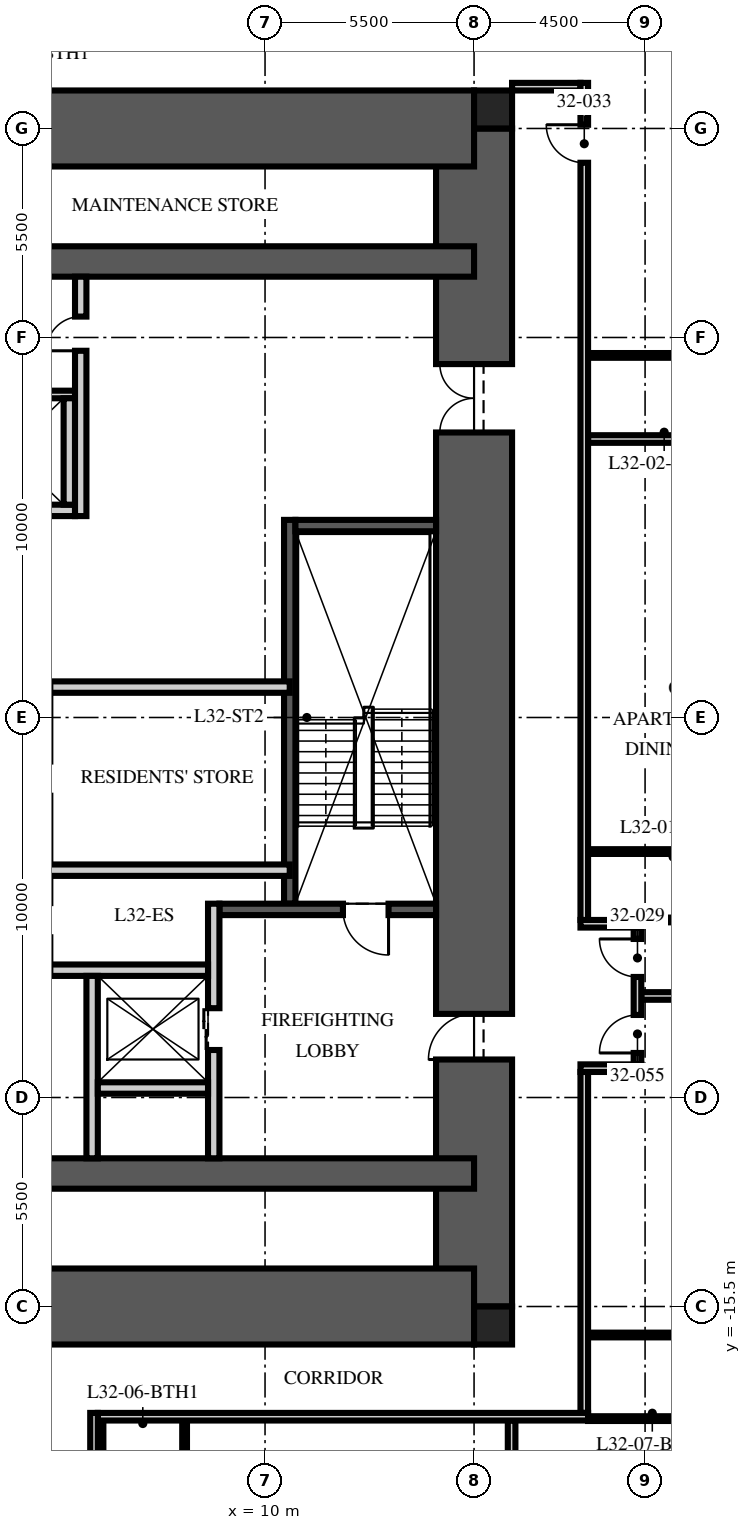
"""IFC4 building model, lengths in metres.
Left out: names, types, materials, properties, quantities, classifications, styles, units other than length and angle.
Written with IfcOpenShell. Run it as: python <this file> out.ifc"""

import sys

from ifc_helpers import new_model, si_unit, direction, frame, frame_2d, origin, origin_2d, place, context, subcontext, project, spatial, rectangle, extrude, element, fill, save


model = new_model("IFC4")
c1 = context("Model", 3, precision=1e-05, world=origin(), true_north=direction((0.0, 1.0)))
c2 = subcontext(c1, "Body", "Model", "MODEL_VIEW")
j1 = project(units=[si_unit("LENGTHUNIT", "METRE"), si_unit("PLANEANGLEUNIT", "RADIAN")], contexts=[c1])
p1 = place(None, origin())
s1 = spatial("IfcSite", under=j1, at=p1, CompositionType="ELEMENT")
p2 = place(p1, origin())
s2 = spatial("IfcBuilding", under=s1, at=p2, CompositionType="ELEMENT")
p3 = place(p2, frame((0.0, 0.0, 129.75)))
s3 = spatial("IfcBuildingStorey", under=s2, at=p3, CompositionType="ELEMENT", Elevation=129.75)
p4 = place(p3, frame((15.5, -15.5, -0.25), z_axis=(0.0, 0.0, 1.0), x_axis=(0.0, 1.0, 0.0)))
e1 = element("IfcWall", 1, at=p4, inside=s3, PredefinedType="SHEAR", context=c2, shape_type="SweptSolid", body=[
    extrude(rectangle(XDim=31.0, YDim=2.0, at=frame_2d((15.5, 0.0))), origin(), (0.0, 0.0, 1.0), 3.75),
])
p5 = place(p4, frame((6.5, 0.0, 0.25)))
e2 = element("IfcOpeningElement", 2, at=p5, cuts=e1, PredefinedType="OPENING", context=c2, shape_type="SweptSolid", body=[
    extrude(rectangle(XDim=1.2, YDim=2.1, at=frame_2d((0.6, 1.05))), frame((0.0, 1.01, 0.0), z_axis=(0.0, -1.0, 0.0), x_axis=(1.0, 0.0, 0.0)), (0.0, 0.0, 1.0), 2.02),
])
p6 = place(p4, frame((23.0, 0.0, 0.25)))
e3 = element("IfcOpeningElement", 3, at=p6, cuts=e1, PredefinedType="OPENING", context=c2, shape_type="SweptSolid", body=[
    extrude(rectangle(XDim=1.8, YDim=2.1, at=frame_2d((0.9, 1.05))), frame((0.0, 1.01, 0.0), z_axis=(0.0, -1.0, 0.0), x_axis=(1.0, 0.0, 0.0)), (0.0, 0.0, 1.0), 2.02),
])
p7 = place(p3, frame((-15.5, 15.5, -0.25), z_axis=(0.0, 0.0, 1.0), x_axis=(1.0, 0.0, 0.0)))
e4 = element("IfcWall", 4, at=p7, inside=s3, PredefinedType="SHEAR", context=c2, shape_type="SweptSolid", body=[
    extrude(rectangle(XDim=31.0, YDim=2.0, at=frame_2d((15.5, 0.0))), origin(), (0.0, 0.0, 1.0), 3.75),
])
p8 = place(p7, frame((5.0, 0.0, 0.25)))
e5 = element("IfcOpeningElement", 5, at=p8, cuts=e4, PredefinedType="OPENING", context=c2, shape_type="SweptSolid", body=[
    extrude(rectangle(XDim=1.0, YDim=2.1, at=frame_2d((0.5, 1.05))), frame((0.0, 1.01, 0.0), z_axis=(0.0, -1.0, 0.0), x_axis=(1.0, 0.0, 0.0)), (0.0, 0.0, 1.0), 2.02),
])
p9 = place(p3, frame((-15.5, -15.5, -0.25), z_axis=(0.0, 0.0, 1.0), x_axis=(1.0, 0.0, 0.0)))
e6 = element("IfcWall", 6, at=p9, inside=s3, PredefinedType="SHEAR", context=c2, shape_type="SweptSolid", body=[
    extrude(rectangle(XDim=31.0, YDim=2.0, at=frame_2d((15.5, 0.0))), origin(), (0.0, 0.0, 1.0), 3.75),
])
p10 = place(p9, frame((10.4, 0.0, 0.25)))
e7 = element("IfcOpeningElement", 7, at=p10, cuts=e6, PredefinedType="OPENING", context=c2, shape_type="SweptSolid", body=[
    extrude(rectangle(XDim=1.1, YDim=2.1, at=frame_2d((0.55, 1.05))), frame((0.0, 1.01, 0.0), z_axis=(0.0, -1.0, 0.0), x_axis=(1.0, 0.0, 0.0)), (0.0, 0.0, 1.0), 2.02),
])
p11 = place(p9, frame((13.5, 0.0, 0.25)))
e8 = element("IfcOpeningElement", 8, at=p11, cuts=e6, PredefinedType="OPENING", context=c2, shape_type="SweptSolid", body=[
    extrude(rectangle(XDim=1.1, YDim=2.1, at=frame_2d((0.55, 1.05))), frame((0.0, 1.01, 0.0), z_axis=(0.0, -1.0, 0.0), x_axis=(1.0, 0.0, 0.0)), (0.0, 0.0, 1.0), 2.02),
])
p12 = place(p9, frame((16.6, 0.0, 0.25)))
e9 = element("IfcOpeningElement", 9, at=p12, cuts=e6, PredefinedType="OPENING", context=c2, shape_type="SweptSolid", body=[
    extrude(rectangle(XDim=1.1, YDim=2.1, at=frame_2d((0.55, 1.05))), frame((0.0, 1.01, 0.0), z_axis=(0.0, -1.0, 0.0), x_axis=(1.0, 0.0, 0.0)), (0.0, 0.0, 1.0), 2.02),
])
for number, where, z_axis, x_axis in (
    (10, (-15.5, 12.0, -0.25), (0.0, 0.0, 1.0), (1.0, 0.0, 0.0)),
    (11, (-15.5, -12.0, -0.25), (0.0, 0.0, 1.0), (1.0, 0.0, 0.0)),
):
    element("IfcWall", number, at=place(p3, frame(where, z_axis=z_axis, x_axis=x_axis)), inside=s3, PredefinedType="SHEAR", context=c2, shape_type="SweptSolid", body=[
        extrude(rectangle(XDim=31.0, YDim=0.8, at=frame_2d((15.5, 0.0))), origin(), (0.0, 0.0, 1.0), 3.75),
    ])
for number, where, z_axis, x_axis in (
    (12, (16.0, 16.0, -0.25), (0.0, 0.0, 1.0), (1.0, 0.0, 0.0)),
    (13, (16.0, -16.0, -0.25), (0.0, 0.0, 1.0), (1.0, 0.0, 0.0)),
):
    element("IfcColumn", number, at=place(p3, frame(where, z_axis=z_axis, x_axis=x_axis)), inside=s3, PredefinedType="COLUMN", context=c2, shape_type="SweptSolid", body=[
        extrude(rectangle(XDim=1.0, YDim=1.0, at=origin_2d()), origin(), (0.0, 0.0, 1.0), 3.75),
    ])
p13 = place(p3, frame((10.65, -4.9, 0.0), z_axis=(0.0, 0.0, 1.0), x_axis=(0.0, 1.0, 0.0)))
e14 = element("IfcWall", 14, at=p13, inside=s3, PredefinedType="SOLIDWALL", context=c2, shape_type="SweptSolid", body=[
    extrude(rectangle(XDim=10.1, YDim=0.3, at=frame_2d((5.05, 0.0))), origin(), (0.0, 0.0, 1.0), 3.5),
])
p14 = place(p3, frame((14.5, -5.05, 0.0), z_axis=(0.0, 0.0, 1.0), x_axis=(-1.0, 0.0, 0.0)))
e15 = element("IfcWall", 15, at=p14, inside=s3, PredefinedType="SOLIDWALL", context=c2, shape_type="SweptSolid", body=[
    extrude(rectangle(XDim=5.7, YDim=0.3, at=frame_2d((2.85, 0.0))), origin(), (0.0, 0.0, 1.0), 3.5),
])
p15 = place(p14, frame((1.25, 0.0, 0.0)))
e16 = element("IfcOpeningElement", 16, at=p15, cuts=e15, PredefinedType="OPENING", context=c2, shape_type="SweptSolid", body=[
    extrude(rectangle(XDim=1.2, YDim=2.1, at=frame_2d((0.6, 1.05))), frame((0.0, 0.16, 0.0), z_axis=(0.0, -1.0, 0.0), x_axis=(1.0, 0.0, 0.0)), (0.0, 0.0, 1.0), 0.32),
])
p16 = place(p3, frame((14.5, 5.05, 0.0), z_axis=(0.0, 0.0, 1.0), x_axis=(-1.0, 0.0, 0.0)))
e17 = element("IfcWall", 17, at=p16, inside=s3, PredefinedType="SOLIDWALL", context=c2, shape_type="SweptSolid", body=[
    extrude(rectangle(XDim=3.7, YDim=0.3, at=frame_2d((1.85, 0.0))), origin(), (0.0, 0.0, 1.0), 3.5),
])
p17 = place(p3, frame((8.65, -11.6, 0.0), z_axis=(0.0, 0.0, 1.0), x_axis=(0.0, 1.0, 0.0)))
e18 = element("IfcWall", 18, at=p17, inside=s3, PredefinedType="PARTITIONING", context=c2, shape_type="SweptSolid", body=[
    extrude(rectangle(XDim=6.7, YDim=0.3, at=frame_2d((3.35, 0.0))), origin(), (0.0, 0.0, 1.0), 3.5),
])
p18 = place(p17, frame((2.85, 0.0, 0.0)))
e19 = element("IfcOpeningElement", 19, at=p18, cuts=e18, PredefinedType="OPENING", context=c2, shape_type="SweptSolid", body=[
    extrude(rectangle(XDim=1.1, YDim=2.1, at=frame_2d((0.55, 1.05))), frame((0.0, 0.16, 0.0), z_axis=(0.0, -1.0, 0.0), x_axis=(1.0, 0.0, 0.0)), (0.0, 0.0, 1.0), 0.32),
])
p19 = place(p3, frame((-8.5, -6.65, 0.0), z_axis=(0.0, 0.0, 1.0), x_axis=(1.0, 0.0, 0.0)))
e20 = element("IfcWall", 20, at=p19, inside=s3, PredefinedType="PARTITIONING", context=c2, shape_type="SweptSolid", body=[
    extrude(rectangle(XDim=17.0, YDim=0.3, at=frame_2d((8.5, 0.0))), origin(), (0.0, 0.0, 1.0), 3.5),
])
p20 = place(p19, frame((7.8, 0.0, 0.0)))
e21 = element("IfcOpeningElement", 21, at=p20, cuts=e20, PredefinedType="OPENING", context=c2, shape_type="SweptSolid", body=[
    extrude(rectangle(XDim=1.3, YDim=2.4, at=frame_2d((0.65, 1.2))), frame((0.0, 0.16, 0.0), z_axis=(0.0, -1.0, 0.0), x_axis=(1.0, 0.0, 0.0)), (0.0, 0.0, 1.0), 0.32),
])
p21 = place(p19, frame((5.65, 0.0, 0.0)))
e22 = element("IfcOpeningElement", 22, at=p21, cuts=e20, PredefinedType="OPENING", context=c2, shape_type="SweptSolid", body=[
    extrude(rectangle(XDim=0.9, YDim=2.1, at=frame_2d((0.45, 1.05))), frame((0.0, 0.16, 0.0), z_axis=(0.0, -1.0, 0.0), x_axis=(1.0, 0.0, 0.0)), (0.0, 0.0, 1.0), 0.32),
])
p22 = place(p19, frame((10.4, 0.0, 0.0)))
e23 = element("IfcOpeningElement", 23, at=p22, cuts=e20, PredefinedType="OPENING", context=c2, shape_type="SweptSolid", body=[
    extrude(rectangle(XDim=0.9, YDim=2.1, at=frame_2d((0.45, 1.05))), frame((0.0, 0.16, 0.0), z_axis=(0.0, -1.0, 0.0), x_axis=(1.0, 0.0, 0.0)), (0.0, 0.0, 1.0), 0.32),
])
p23 = place(p3, frame((5.45, -11.6, 0.0), z_axis=(0.0, 0.0, 1.0), x_axis=(0.0, 1.0, 0.0)))
e24 = element("IfcWall", 24, at=p23, inside=s3, PredefinedType="PARTITIONING", context=c2, shape_type="SweptSolid", body=[
    extrude(rectangle(XDim=4.8, YDim=0.3, at=frame_2d((2.4, 0.0))), origin(), (0.0, 0.0, 1.0), 3.5),
])
p24 = place(p3, frame((5.6, -9.75, 0.0), z_axis=(0.0, 0.0, 1.0), x_axis=(1.0, 0.0, 0.0)))
e25 = element("IfcWall", 25, at=p24, inside=s3, PredefinedType="PARTITIONING", context=c2, shape_type="SweptSolid", body=[
    extrude(rectangle(XDim=2.9, YDim=0.3, at=frame_2d((1.45, 0.0))), origin(), (0.0, 0.0, 1.0), 3.5),
])
p25 = place(p3, frame((-4.7, 5.45, 0.0), z_axis=(0.0, 0.0, 1.0), x_axis=(1.0, 0.0, 0.0)))
e26 = element("IfcWall", 26, at=p25, inside=s3, PredefinedType="PARTITIONING", context=c2, shape_type="SweptSolid", body=[
    extrude(rectangle(XDim=9.7, YDim=0.3, at=frame_2d((4.85, 0.0))), origin(), (0.0, 0.0, 1.0), 3.5),
])
p26 = place(p3, frame((-4.7, 8.5, 0.0), z_axis=(0.0, 0.0, 1.0), x_axis=(1.0, 0.0, 0.0)))
e27 = element("IfcWall", 27, at=p26, inside=s3, PredefinedType="PARTITIONING", context=c2, shape_type="SweptSolid", body=[
    extrude(rectangle(XDim=9.7, YDim=0.2, at=frame_2d((4.85, 0.0))), origin(), (0.0, 0.0, 1.0), 3.5),
])
p27 = place(p3, frame((4.85, 5.6, 0.0), z_axis=(0.0, 0.0, 1.0), x_axis=(0.0, 1.0, 0.0)))
e28 = element("IfcWall", 28, at=p27, inside=s3, PredefinedType="PARTITIONING", context=c2, shape_type="SweptSolid", body=[
    extrude(rectangle(XDim=2.8, YDim=0.3, at=frame_2d((1.4, 0.0))), origin(), (0.0, 0.0, 1.0), 3.5),
])
p28 = place(p3, frame((-10.65, 0.8, 0.0), z_axis=(0.0, 0.0, 1.0), x_axis=(1.0, 0.0, 0.0)))
e29 = element("IfcWall", 29, at=p28, inside=s3, PredefinedType="PARTITIONING", context=c2, shape_type="SweptSolid", body=[
    extrude(rectangle(XDim=21.3, YDim=0.3, at=frame_2d((10.65, 0.0))), origin(), (0.0, 0.0, 1.0), 3.5),
])
p29 = place(p28, frame((10.05, 0.0, 0.0)))
e30 = element("IfcOpeningElement", 30, at=p29, cuts=e29, PredefinedType="OPENING", context=c2, shape_type="SweptSolid", body=[
    extrude(rectangle(XDim=1.2, YDim=2.1, at=frame_2d((0.6, 1.05))), frame((0.0, 0.16, 0.0), z_axis=(0.0, -1.0, 0.0), x_axis=(1.0, 0.0, 0.0)), (0.0, 0.0, 1.0), 0.32),
])
p30 = place(p28, frame((0.793, 0.0, 0.0)))
e31 = element("IfcOpeningElement", 31, at=p30, cuts=e29, PredefinedType="OPENING", context=c2, shape_type="SweptSolid", body=[
    extrude(rectangle(XDim=0.9, YDim=2.1, at=frame_2d((0.45, 1.05))), frame((0.0, 0.16, 0.0), z_axis=(0.0, -1.0, 0.0), x_axis=(1.0, 0.0, 0.0)), (0.0, 0.0, 1.0), 0.32),
])
p31 = place(p3, frame((10.65, -4.018, 0.0), z_axis=(0.0, 0.0, 1.0), x_axis=(-1.0, 0.0, 0.0)))
e32 = element("IfcWall", 32, at=p31, inside=s3, PredefinedType="PARTITIONING", context=c2, shape_type="SweptSolid", body=[
    extrude(rectangle(XDim=6.45, YDim=0.3, at=frame_2d((3.225, 0.0))), origin(), (0.0, 0.0, 1.0), 3.5),
])
p32 = place(p3, frame((5.15, 5.3, 0.0), z_axis=(0.0, 0.0, 1.0), x_axis=(0.0, 1.0, 0.0)))
e33 = element("IfcWall", 33, at=p32, inside=s3, PredefinedType="PARTITIONING", context=c2, shape_type="SweptSolid", body=[
    extrude(rectangle(XDim=6.3, YDim=0.3, at=frame_2d((3.15, 0.0))), origin(), (0.0, 0.0, 1.0), 3.5),
])
p33 = place(p32, frame((4.35, 0.0, 0.0)))
e34 = element("IfcOpeningElement", 34, at=p33, cuts=e33, PredefinedType="OPENING", context=c2, shape_type="SweptSolid", body=[
    extrude(rectangle(XDim=0.9, YDim=2.1, at=frame_2d((0.45, 1.05))), frame((0.0, 0.16, 0.0), z_axis=(0.0, -1.0, 0.0), x_axis=(1.0, 0.0, 0.0)), (0.0, 0.0, 1.0), 0.32),
])
p34 = place(p3, frame((16.5, 16.6, 0.0), z_axis=(0.0, 0.0, 1.0), x_axis=(1.0, 0.0, 0.0)))
e35 = element("IfcWall", 35, at=p34, inside=s3, PredefinedType="PARTITIONING", context=c2, shape_type="SweptSolid", body=[
    extrude(rectangle(XDim=1.8, YDim=0.2, at=frame_2d((0.9, 0.0))), origin(), (0.0, 0.0, 1.0), 2.3),
])
p35 = place(p3, frame((19.9, -7.328, 0.0), z_axis=(0.0, 0.0, 1.0), x_axis=(1.0, 0.0, 0.0)))
e36 = element("IfcWall", 36, at=p35, inside=s3, PredefinedType="PARTITIONING", context=c2, shape_type="SweptSolid", body=[
    extrude(rectangle(XDim=9.0, YDim=0.2, at=frame_2d((4.5, 0.0))), origin(), (0.0, 0.0, 1.0), 2.81),
])
for number, where, z_axis, x_axis in (
    (37, (18.5, 7.328, 0.0), (0.0, 0.0, 1.0), (1.0, 0.0, 0.0)),
    (38, (16.488, -18.5, 0.0), (0.0, 0.0, 1.0), (0.0, -1.0, 0.0)),
):
    element("IfcWall", number, at=place(p3, frame(where, z_axis=z_axis, x_axis=x_axis)), inside=s3, PredefinedType="PARTITIONING", context=c2, shape_type="SweptSolid", body=[
        extrude(rectangle(XDim=10.4, YDim=0.2, at=frame_2d((5.2, 0.0))), origin(), (0.0, 0.0, 1.0), 2.81),
    ])
p36 = place(p3, frame((19.97, -5.328, 0.0), z_axis=(0.0, 0.0, 1.0), x_axis=(1.0, 0.0, 0.0)))
e39 = element("IfcWall", 39, at=p36, inside=s3, PredefinedType="PARTITIONING", context=c2, shape_type="SweptSolid", body=[
    extrude(rectangle(XDim=2.81, YDim=0.125, at=frame_2d((1.405, 0.0))), origin(), (0.0, 0.0, 1.0), 3.5),
])
for number, where, z_axis, x_axis in (
    (40, (18.5, -3.528, 0.0), (0.0, 0.0, 1.0), (1.0, 0.0, 0.0)),
    (41, (18.5, 9.528, 0.0), (0.0, 0.0, 1.0), (1.0, 0.0, 0.0)),
    (42, (5.684, -18.5, 0.0), (0.0, 0.0, 1.0), (0.0, -1.0, 0.0)),
    (43, (7.884, -18.5, 0.0), (0.0, 0.0, 1.0), (0.0, -1.0, 0.0)),
):
    element("IfcWall", number, at=place(p3, frame(where, z_axis=z_axis, x_axis=x_axis)), inside=s3, PredefinedType="PARTITIONING", context=c2, shape_type="SweptSolid", body=[
        extrude(rectangle(XDim=4.28, YDim=0.125, at=frame_2d((2.14, 0.0))), origin(), (0.0, 0.0, 1.0), 3.5),
    ])
p37 = place(p3, frame((18.5, -18.45, 0.0), z_axis=(0.0, 0.0, 1.0), x_axis=(1.0, 0.0, 0.0)))
e44 = element("IfcWall", 44, at=p37, inside=s3, PredefinedType="PARTITIONING", context=c2, shape_type="SweptSolid", body=[
    extrude(rectangle(XDim=4.28, YDim=0.125, at=frame_2d((2.14, 0.0))), origin(), (0.0, 0.0, 1.0), 2.3),
])
p38 = place(p3, frame((18.5, -16.25, 0.0), z_axis=(0.0, 0.0, 1.0), x_axis=(1.0, 0.0, 0.0)))
e45 = element("IfcWall", 45, at=p38, inside=s3, PredefinedType="PARTITIONING", context=c2, shape_type="SweptSolid", body=[
    extrude(rectangle(XDim=4.28, YDim=0.125, at=frame_2d((2.14, 0.0))), origin(), (0.0, 0.0, 1.0), 3.5),
])
p39 = place(p3, frame((18.4, -18.3, 0.0), z_axis=(0.0, 0.0, 1.0), x_axis=(0.0, 1.0, 0.0)))
e46 = element("IfcWall", 46, at=p39, inside=s3, PredefinedType="PARTITIONING", context=c2, shape_type="SweptSolid", body=[
    extrude(rectangle(XDim=8.972, YDim=0.2, at=frame_2d((4.486, 0.0))), origin(), (0.0, 0.0, 1.0), 2.3),
])
p40 = place(p3, frame((18.3, -9.228, 0.0), z_axis=(0.0, 0.0, 1.0), x_axis=(1.0, 0.0, 0.0)))
e47 = element("IfcWall", 47, at=p40, inside=s3, PredefinedType="PARTITIONING", context=c2, shape_type="SweptSolid", body=[
    extrude(rectangle(XDim=1.6, YDim=0.2, at=frame_2d((0.8, 0.0))), origin(), (0.0, 0.0, 1.0), 2.7),
])
p41 = place(p3, frame((18.3, -5.428, 0.0), z_axis=(0.0, 0.0, 1.0), x_axis=(1.0, 0.0, 0.0)))
e48 = element("IfcWall", 48, at=p41, inside=s3, PredefinedType="PARTITIONING", context=c2, shape_type="SweptSolid", body=[
    extrude(rectangle(XDim=1.6, YDim=0.2, at=frame_2d((0.8, 0.0))), origin(), (0.0, 0.0, 1.0), 3.5),
])
p42 = place(p3, frame((19.8, -9.128, 0.0), z_axis=(0.0, 0.0, 1.0), x_axis=(0.0, 1.0, 0.0)))
e49 = element("IfcWall", 49, at=p42, inside=s3, PredefinedType="PARTITIONING", context=c2, shape_type="SweptSolid", body=[
    extrude(rectangle(XDim=3.6, YDim=0.2, at=frame_2d((1.8, 0.0))), origin(), (0.0, 0.0, 1.0), 2.7),
])
p43 = place(p42, frame((2.3, 0.0, 0.0)))
e50 = element("IfcOpeningElement", 50, at=p43, cuts=e49, PredefinedType="OPENING", context=c2, shape_type="SweptSolid", body=[
    extrude(rectangle(XDim=1.0, YDim=2.2, at=frame_2d((0.5, 1.1))), frame((0.0, 0.11, 0.0), z_axis=(0.0, -1.0, 0.0), x_axis=(1.0, 0.0, 0.0)), (0.0, 0.0, 1.0), 0.22),
])
p44 = place(p42, frame((0.3, 0.0, 0.0)))
e51 = element("IfcOpeningElement", 51, at=p44, cuts=e49, PredefinedType="OPENING", context=c2, shape_type="SweptSolid", body=[
    extrude(rectangle(XDim=1.0, YDim=2.2, at=frame_2d((0.5, 1.1))), frame((0.0, 0.11, 0.0), z_axis=(0.0, -1.0, 0.0), x_axis=(1.0, 0.0, 0.0)), (0.0, 0.0, 1.0), 0.22),
])
p45 = place(p3, frame((18.4, -5.328, 0.0), z_axis=(0.0, 0.0, 1.0), x_axis=(0.0, 1.0, 0.0)))
e52 = element("IfcWall", 52, at=p45, inside=s3, PredefinedType="PARTITIONING", context=c2, shape_type="SweptSolid", body=[
    extrude(rectangle(XDim=22.028, YDim=0.2, at=frame_2d((11.014, 0.0))), origin(), (0.0, 0.0, 1.0), 2.7),
])
p46 = place(p45, frame((19.926, 0.0, 0.0)))
e53 = element("IfcOpeningElement", 53, at=p46, cuts=e52, PredefinedType="OPENING", context=c2, shape_type="SweptSolid", body=[
    extrude(rectangle(XDim=1.0, YDim=2.2, at=frame_2d((0.5, 1.1))), frame((0.0, 0.11, 0.0), z_axis=(0.0, -1.0, 0.0), x_axis=(1.0, 0.0, 0.0)), (0.0, 0.0, 1.0), 0.22),
])
p47 = place(p3, frame((18.5, -18.4, 0.0), z_axis=(0.0, 0.0, 1.0), x_axis=(-1.0, 0.0, 0.0)))
e54 = element("IfcWall", 54, at=p47, inside=s3, PredefinedType="PARTITIONING", context=c2, shape_type="SweptSolid", body=[
    extrude(rectangle(XDim=12.9, YDim=0.2, at=frame_2d((6.45, 0.0))), origin(), (0.0, 0.0, 1.0), 2.3),
])
p48 = place(p3, frame((5.5, -18.3, 0.0), z_axis=(0.0, 0.0, 1.0), x_axis=(0.0, -1.0, 0.0)))
e55 = element("IfcWall", 55, at=p48, inside=s3, PredefinedType="PARTITIONING", context=c2, shape_type="SweptSolid", body=[
    extrude(rectangle(XDim=3.0, YDim=0.2, at=frame_2d((1.5, 0.0))), origin(), (0.0, 0.0, 1.0), 3.5),
])
p49 = place(p15, origin())
e56 = element("IfcDoor", 56, at=p49, inside=s3, OperationType="SINGLE_SWING_LEFT", PredefinedType="DOOR", context=c2, shape_type="SweptSolid", body=[
    extrude(rectangle(XDim=1.2, YDim=2.1, at=frame_2d((0.6, 1.05))), frame((0.0, 0.025, 0.0), z_axis=(0.0, -1.0, 0.0), x_axis=(1.0, 0.0, 0.0)), (0.0, 0.0, 1.0), 0.05),
])
fill(e16, e56)
p50 = place(p5, origin())
e57 = element("IfcDoor", 57, at=p50, inside=s3, OperationType="SINGLE_SWING_LEFT", PredefinedType="DOOR", context=c2, shape_type="SweptSolid", body=[
    extrude(rectangle(XDim=1.2, YDim=2.1, at=frame_2d((0.6, 1.05))), frame((0.0, 0.025, 0.0), z_axis=(0.0, -1.0, 0.0), x_axis=(1.0, 0.0, 0.0)), (0.0, 0.0, 1.0), 0.05),
])
fill(e2, e57)
p51 = place(p6, origin())
e58 = element("IfcDoor", 58, at=p51, inside=s3, OperationType="DOUBLE_DOOR_SINGLE_SWING", PredefinedType="DOOR", context=c2, shape_type="SweptSolid", body=[
    extrude(rectangle(XDim=1.8, YDim=2.1, at=frame_2d((0.9, 1.05))), frame((0.0, 0.025, 0.0), z_axis=(0.0, -1.0, 0.0), x_axis=(1.0, 0.0, 0.0)), (0.0, 0.0, 1.0), 0.05),
])
fill(e3, e58)
p52 = place(p18, origin())
e59 = element("IfcDoor", 59, at=p52, inside=s3, OperationType="DOUBLE_DOOR_SLIDING", PredefinedType="DOOR", context=c2, shape_type="SweptSolid", body=[
    extrude(rectangle(XDim=1.1, YDim=2.1, at=frame_2d((0.55, 1.05))), frame((0.0, 0.025, 0.0), z_axis=(0.0, -1.0, 0.0), x_axis=(1.0, 0.0, 0.0)), (0.0, 0.0, 1.0), 0.05),
])
fill(e19, e59)
p53 = place(p33, origin())
e60 = element("IfcDoor", 60, at=p53, inside=s3, OperationType="SINGLE_SWING_LEFT", PredefinedType="DOOR", context=c2, shape_type="SweptSolid", body=[
    extrude(rectangle(XDim=0.9, YDim=2.1, at=frame_2d((0.45, 1.05))), frame((0.0, 0.025, 0.0), z_axis=(0.0, -1.0, 0.0), x_axis=(1.0, 0.0, 0.0)), (0.0, 0.0, 1.0), 0.05),
])
fill(e34, e60)
p54 = place(p43, origin())
e61 = element("IfcDoor", 61, at=p54, inside=s3, OperationType="SINGLE_SWING_RIGHT", PredefinedType="DOOR", context=c2, shape_type="SweptSolid", body=[
    extrude(rectangle(XDim=1.0, YDim=2.2, at=frame_2d((0.5, 1.1))), frame((0.0, 0.025, 0.0), z_axis=(0.0, -1.0, 0.0), x_axis=(1.0, 0.0, 0.0)), (0.0, 0.0, 1.0), 0.05),
])
fill(e50, e61)
p55 = place(p46, origin())
e62 = element("IfcDoor", 62, at=p55, inside=s3, OperationType="SINGLE_SWING_RIGHT", PredefinedType="DOOR", context=c2, shape_type="SweptSolid", body=[
    extrude(rectangle(XDim=1.0, YDim=2.2, at=frame_2d((0.5, 1.1))), frame((0.0, 0.025, 0.0), z_axis=(0.0, -1.0, 0.0), x_axis=(1.0, 0.0, 0.0)), (0.0, 0.0, 1.0), 0.05),
])
fill(e53, e62)
p56 = place(p44, origin())
e63 = element("IfcDoor", 63, at=p56, inside=s3, OperationType="SINGLE_SWING_LEFT", PredefinedType="DOOR", context=c2, shape_type="SweptSolid", body=[
    extrude(rectangle(XDim=1.0, YDim=2.2, at=frame_2d((0.5, 1.1))), frame((0.0, 0.025, 0.0), z_axis=(0.0, -1.0, 0.0), x_axis=(1.0, 0.0, 0.0)), (0.0, 0.0, 1.0), 0.05),
])
fill(e51, e63)
save(model, sys.argv[1])
